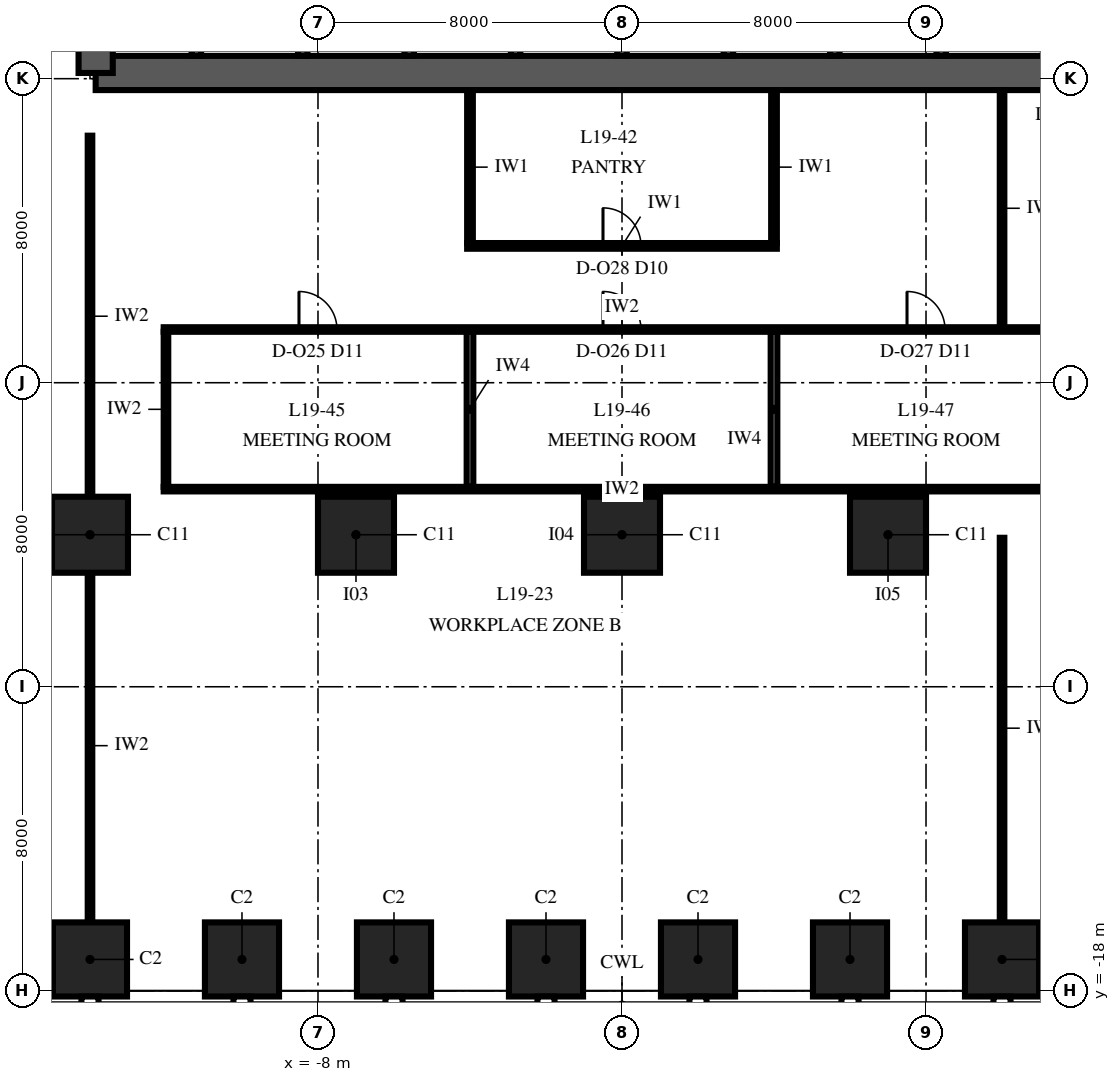
"""IFC4 building model, lengths in metres.
Left out: names, types, materials, properties, quantities, classifications, styles, units other than length and angle.
Written with IfcOpenShell. Run it as: python <this file> out.ifc"""

import sys

from ifc_helpers import new_model, si_unit, direction, frame, frame_2d, origin, origin_2d, place, context, subcontext, project, spatial, polyline, rectangle, outline, extrude, element, fill, save


model = new_model("IFC4")
c1 = context("Model", 3, precision=1e-05, world=origin(), true_north=direction((0.0, 1.0)))
c2 = subcontext(c1, "Body", "Model", "MODEL_VIEW")
j1 = project(units=[si_unit("LENGTHUNIT", "METRE"), si_unit("PLANEANGLEUNIT", "RADIAN")], contexts=[c1])
p1 = place(None, origin())
s1 = spatial("IfcSite", under=j1, at=p1, CompositionType="ELEMENT")
p2 = place(p1, origin())
s2 = spatial("IfcBuilding", under=s1, at=p2, CompositionType="ELEMENT")
p3 = place(p2, frame((0.0, 0.0, 88.0)))
s3 = spatial("IfcBuildingStorey", under=s2, at=p3, CompositionType="ELEMENT", Elevation=88.0)
for number, where, z_axis, x_axis in (
    (1, (-14.0, -17.175, 0.0), (0.0, 0.0, 1.0), (1.0, 0.0, 0.0)),
    (2, (-10.0, -17.175, 0.0), (0.0, 0.0, 1.0), (1.0, 0.0, 0.0)),
    (3, (-6.0, -17.175, 0.0), (0.0, 0.0, 1.0), (1.0, 0.0, 0.0)),
    (4, (-2.0, -17.175, 0.0), (0.0, 0.0, 1.0), (1.0, 0.0, 0.0)),
    (5, (2.0, -17.175, 0.0), (0.0, 0.0, 1.0), (1.0, 0.0, 0.0)),
    (6, (6.0, -17.175, 0.0), (0.0, 0.0, 1.0), (1.0, 0.0, 0.0)),
    (7, (10.0, -17.175, 0.0), (0.0, 0.0, 1.0), (1.0, 0.0, 0.0)),
):
    element("IfcColumn", number, at=place(p3, frame(where, z_axis=z_axis, x_axis=x_axis)), inside=s3, PredefinedType="COLUMN", context=c2, shape_type="SweptSolid", body=[
        extrude(rectangle(XDim=1.95, YDim=1.95, at=origin_2d()), origin(), (0.0, 0.0, 1.0), 4.0),
    ])
for number, where, z_axis, x_axis in (
    (8, (-14.0, -6.0, 0.0), (0.0, 0.0, 1.0), (1.0, 0.0, 0.0)),
    (9, (-7.0, -6.0, 0.0), (0.0, 0.0, 1.0), (1.0, 0.0, 0.0)),
    (10, (0.0, -6.0, 0.0), (0.0, 0.0, 1.0), (1.0, 0.0, 0.0)),
    (11, (7.0, -6.0, 0.0), (0.0, 0.0, 1.0), (1.0, 0.0, 0.0)),
):
    element("IfcColumn", number, at=place(p3, frame(where, z_axis=z_axis, x_axis=x_axis)), inside=s3, PredefinedType="COLUMN", context=c2, shape_type="SweptSolid", body=[
        extrude(rectangle(XDim=2.0, YDim=2.0, at=origin_2d()), origin(), (0.0, 0.0, 1.0), 4.0),
    ])
p4 = place(p3, frame((-13.85, 6.15, 0.0), z_axis=(0.0, 0.0, 1.0), x_axis=(1.0, 0.0, 0.0)))
e12 = element("IfcWall", 12, at=p4, inside=s3, PredefinedType="SHEAR", context=c2, shape_type="SweptSolid", body=[
    extrude(rectangle(XDim=27.7, YDim=0.9, at=frame_2d((13.85, 0.0))), origin(), (0.0, 0.0, 1.0), 4.0),
])
p5 = place(p3, frame((-13.85, 23.85, 0.0), z_axis=(0.0, 0.0, 1.0), x_axis=(0.0, -1.0, 0.0)))
e13 = element("IfcWall", 13, at=p5, inside=s3, PredefinedType="SHEAR", context=c2, shape_type="SweptSolid", body=[
    extrude(outline(polyline([(0.0, -0.45), (17.7, -0.45), (17.7, 0.0), (17.25, 0.0), (17.25, 0.45), (0.45, 0.45), (0.45, 0.0), (0.0, 0.0), (0.0, -0.45)])), origin(), (0.0, 0.0, 1.0), 4.0),
])
p6 = place(p5, frame((11.75, 0.0, 0.0)))
e14 = element("IfcOpeningElement", 14, at=p6, cuts=e13, PredefinedType="OPENING", context=c2, shape_type="SweptSolid", body=[
    extrude(rectangle(XDim=1.8, YDim=2.4, at=frame_2d((0.9, 1.2))), frame((0.0, 0.465, 0.0), z_axis=(0.0, -1.0, 0.0), x_axis=(1.0, 0.0, 0.0)), (0.0, 0.0, 1.0), 0.93),
])
for number, where, z_axis, x_axis in (
    (15, (-11.2, 6.6, 0.0), (0.0, 0.0, 1.0), (0.0, 1.0, 0.0)),
    (16, (-8.4, 6.6, 0.0), (0.0, 0.0, 1.0), (0.0, 1.0, 0.0)),
    (17, (-5.6, 6.6, 0.0), (0.0, 0.0, 1.0), (0.0, 1.0, 0.0)),
    (18, (-2.8, 6.6, 0.0), (0.0, 0.0, 1.0), (0.0, 1.0, 0.0)),
    (19, (0.0, 6.6, 0.0), (0.0, 0.0, 1.0), (0.0, 1.0, 0.0)),
    (20, (2.8, 6.6, 0.0), (0.0, 0.0, 1.0), (0.0, 1.0, 0.0)),
    (21, (5.6, 6.6, 0.0), (0.0, 0.0, 1.0), (0.0, 1.0, 0.0)),
    (22, (8.4, 6.6, 0.0), (0.0, 0.0, 1.0), (0.0, 1.0, 0.0)),
):
    element("IfcWall", number, at=place(p3, frame(where, z_axis=z_axis, x_axis=x_axis)), inside=s3, PredefinedType="SHEAR", context=c2, shape_type="SweptSolid", body=[
        extrude(rectangle(XDim=2.675, YDim=0.25, at=frame_2d((1.337, 0.0))), origin(), (0.0, 0.0, 1.0), 4.0),
    ])
p7 = place(p3, frame((-12.06, -4.8, 0.0), z_axis=(0.0, 0.0, 1.0), x_axis=(1.0, 0.0, 0.0)))
e23 = element("IfcWall", 23, at=p7, inside=s3, PredefinedType="PARTITIONING", context=c2, shape_type="SweptSolid", body=[
    extrude(rectangle(XDim=24.12, YDim=0.12, at=frame_2d((12.06, 0.0))), origin(), (0.0, 0.0, 1.0), 3.13),
])
p8 = place(p3, frame((-12.06, -0.6, 0.0), z_axis=(0.0, 0.0, 1.0), x_axis=(1.0, 0.0, 0.0)))
e24 = element("IfcWall", 24, at=p8, inside=s3, PredefinedType="PARTITIONING", context=c2, shape_type="SweptSolid", body=[
    extrude(rectangle(XDim=24.12, YDim=0.12, at=frame_2d((12.06, 0.0))), origin(), (0.0, 0.0, 1.0), 3.13),
])
p9 = place(p8, frame((3.56, 0.0, 0.0)))
e25 = element("IfcOpeningElement", 25, at=p9, cuts=e24, PredefinedType="OPENING", context=c2, shape_type="SweptSolid", body=[
    extrude(rectangle(XDim=1.0, YDim=2.4, at=frame_2d((0.5, 1.2))), frame((0.0, 0.075, 0.0), z_axis=(0.0, -1.0, 0.0), x_axis=(1.0, 0.0, 0.0)), (0.0, 0.0, 1.0), 0.15),
])
p10 = place(p8, frame((11.56, 0.0, 0.0)))
e26 = element("IfcOpeningElement", 26, at=p10, cuts=e24, PredefinedType="OPENING", context=c2, shape_type="SweptSolid", body=[
    extrude(rectangle(XDim=1.0, YDim=2.4, at=frame_2d((0.5, 1.2))), frame((0.0, 0.075, 0.0), z_axis=(0.0, -1.0, 0.0), x_axis=(1.0, 0.0, 0.0)), (0.0, 0.0, 1.0), 0.15),
])
p11 = place(p8, frame((19.56, 0.0, 0.0)))
e27 = element("IfcOpeningElement", 27, at=p11, cuts=e24, PredefinedType="OPENING", context=c2, shape_type="SweptSolid", body=[
    extrude(rectangle(XDim=1.0, YDim=2.4, at=frame_2d((0.5, 1.2))), frame((0.0, 0.075, 0.0), z_axis=(0.0, -1.0, 0.0), x_axis=(1.0, 0.0, 0.0)), (0.0, 0.0, 1.0), 0.15),
])
p12 = place(p3, frame((-4.075, 1.6, 0.0), z_axis=(0.0, 0.0, 1.0), x_axis=(1.0, 0.0, 0.0)))
e28 = element("IfcWall", 28, at=p12, inside=s3, PredefinedType="PARTITIONING", context=c2, shape_type="SweptSolid", body=[
    extrude(rectangle(XDim=8.15, YDim=0.15, at=frame_2d((4.075, 0.0))), origin(), (0.0, 0.0, 1.0), 3.13),
])
p13 = place(p12, frame((3.575, 0.0, 0.0)))
e29 = element("IfcOpeningElement", 29, at=p13, cuts=e28, PredefinedType="OPENING", context=c2, shape_type="SweptSolid", body=[
    extrude(rectangle(XDim=1.0, YDim=2.3, at=frame_2d((0.5, 1.15))), frame((0.0, 0.09, 0.0), z_axis=(0.0, -1.0, 0.0), x_axis=(1.0, 0.0, 0.0)), (0.0, 0.0, 1.0), 0.18),
])
p14 = place(p3, frame((-12.0, -4.74, 0.0), z_axis=(0.0, 0.0, 1.0), x_axis=(0.0, 1.0, 0.0)))
e30 = element("IfcWall", 30, at=p14, inside=s3, PredefinedType="PARTITIONING", context=c2, shape_type="SweptSolid", body=[
    extrude(rectangle(XDim=4.08, YDim=0.12, at=frame_2d((2.04, 0.0))), origin(), (0.0, 0.0, 1.0), 3.75),
])
p15 = place(p3, frame((-4.0, -4.74, 0.0), z_axis=(0.0, 0.0, 1.0), x_axis=(0.0, 1.0, 0.0)))
e31 = element("IfcWall", 31, at=p15, inside=s3, PredefinedType="PARTITIONING", context=c2, shape_type="SweptSolid", body=[
    extrude(rectangle(XDim=4.08, YDim=0.175, at=frame_2d((2.04, 0.0))), origin(), (0.0, 0.0, 1.0), 3.75),
])
p16 = place(p3, frame((-4.0, 1.675, 0.0), z_axis=(0.0, 0.0, 1.0), x_axis=(0.0, 1.0, 0.0)))
e32 = element("IfcWall", 32, at=p16, inside=s3, PredefinedType="PARTITIONING", context=c2, shape_type="SweptSolid", body=[
    extrude(rectangle(XDim=3.995, YDim=0.15, at=frame_2d((1.998, 0.0))), origin(), (0.0, 0.0, 1.0), 3.75),
])
p17 = place(p3, frame((4.0, -4.74, 0.0), z_axis=(0.0, 0.0, 1.0), x_axis=(0.0, 1.0, 0.0)))
e33 = element("IfcWall", 33, at=p17, inside=s3, PredefinedType="PARTITIONING", context=c2, shape_type="SweptSolid", body=[
    extrude(rectangle(XDim=4.08, YDim=0.175, at=frame_2d((2.04, 0.0))), origin(), (0.0, 0.0, 1.0), 3.75),
])
p18 = place(p3, frame((4.0, 1.675, 0.0), z_axis=(0.0, 0.0, 1.0), x_axis=(0.0, 1.0, 0.0)))
e34 = element("IfcWall", 34, at=p18, inside=s3, PredefinedType="PARTITIONING", context=c2, shape_type="SweptSolid", body=[
    extrude(rectangle(XDim=3.995, YDim=0.15, at=frame_2d((1.998, 0.0))), origin(), (0.0, 0.0, 1.0), 3.75),
])
p19 = place(p3, frame((-13.999, -16.1, 0.0), z_axis=(0.0, 0.0, 1.0), x_axis=(0.0, 1.0, 0.0)))
e35 = element("IfcWall", 35, at=p19, inside=s3, PredefinedType="PARTITIONING", context=c2, shape_type="SweptSolid", body=[
    extrude(rectangle(XDim=9.1, YDim=0.12, at=frame_2d((4.55, 0.0))), origin(), (0.0, 0.0, 1.0), 3.13),
])
p20 = place(p3, frame((-13.999, -5.0, 0.0), z_axis=(0.0, 0.0, 1.0), x_axis=(0.0, 1.0, 0.0)))
e36 = element("IfcWall", 36, at=p20, inside=s3, PredefinedType="PARTITIONING", context=c2, shape_type="SweptSolid", body=[
    extrude(rectangle(XDim=9.5, YDim=0.12, at=frame_2d((4.75, 0.0))), origin(), (0.0, 0.0, 1.0), 3.13),
])
p21 = place(p3, frame((10.001, -16.1, 0.0), z_axis=(0.0, 0.0, 1.0), x_axis=(0.0, 1.0, 0.0)))
e37 = element("IfcWall", 37, at=p21, inside=s3, PredefinedType="PARTITIONING", context=c2, shape_type="SweptSolid", body=[
    extrude(rectangle(XDim=10.02, YDim=0.12, at=frame_2d((5.01, 0.0))), origin(), (0.0, 0.0, 1.0), 2.742),
])
p22 = place(p3, frame((10.001, -0.52, 0.0), z_axis=(0.0, 0.0, 1.0), x_axis=(0.0, 1.0, 0.0)))
e38 = element("IfcWall", 38, at=p22, inside=s3, PredefinedType="PARTITIONING", context=c2, shape_type="SweptSolid", body=[
    extrude(rectangle(XDim=6.22, YDim=0.12, at=frame_2d((3.11, 0.0))), origin(), (0.0, 0.0, 1.0), 3.75),
])
p23 = place(p9, origin())
e39 = element("IfcDoor", 39, at=p23, inside=s3, OperationType="SINGLE_SWING_RIGHT", PredefinedType="DOOR", context=c2, shape_type="SweptSolid", body=[
    extrude(rectangle(XDim=1.0, YDim=2.4, at=frame_2d((0.5, 1.2))), frame((0.0, 0.06, 0.0), z_axis=(0.0, -1.0, 0.0), x_axis=(1.0, 0.0, 0.0)), (0.0, 0.0, 1.0), 0.12),
])
fill(e25, e39)
p24 = place(p10, origin())
e40 = element("IfcDoor", 40, at=p24, inside=s3, OperationType="SINGLE_SWING_RIGHT", PredefinedType="DOOR", context=c2, shape_type="SweptSolid", body=[
    extrude(rectangle(XDim=1.0, YDim=2.4, at=frame_2d((0.5, 1.2))), frame((0.0, 0.06, 0.0), z_axis=(0.0, -1.0, 0.0), x_axis=(1.0, 0.0, 0.0)), (0.0, 0.0, 1.0), 0.12),
])
fill(e26, e40)
p25 = place(p11, origin())
e41 = element("IfcDoor", 41, at=p25, inside=s3, OperationType="SINGLE_SWING_RIGHT", PredefinedType="DOOR", context=c2, shape_type="SweptSolid", body=[
    extrude(rectangle(XDim=1.0, YDim=2.4, at=frame_2d((0.5, 1.2))), frame((0.0, 0.06, 0.0), z_axis=(0.0, -1.0, 0.0), x_axis=(1.0, 0.0, 0.0)), (0.0, 0.0, 1.0), 0.12),
])
fill(e27, e41)
p26 = place(p13, origin())
e42 = element("IfcDoor", 42, at=p26, inside=s3, OperationType="SINGLE_SWING_LEFT", PredefinedType="DOOR", context=c2, shape_type="SweptSolid", body=[
    extrude(rectangle(XDim=1.0, YDim=2.3, at=frame_2d((0.5, 1.15))), frame((0.0, 0.075, 0.0), z_axis=(0.0, -1.0, 0.0), x_axis=(1.0, 0.0, 0.0)), (0.0, 0.0, 1.0), 0.149),
])
fill(e29, e42)
save(model, sys.argv[1])
